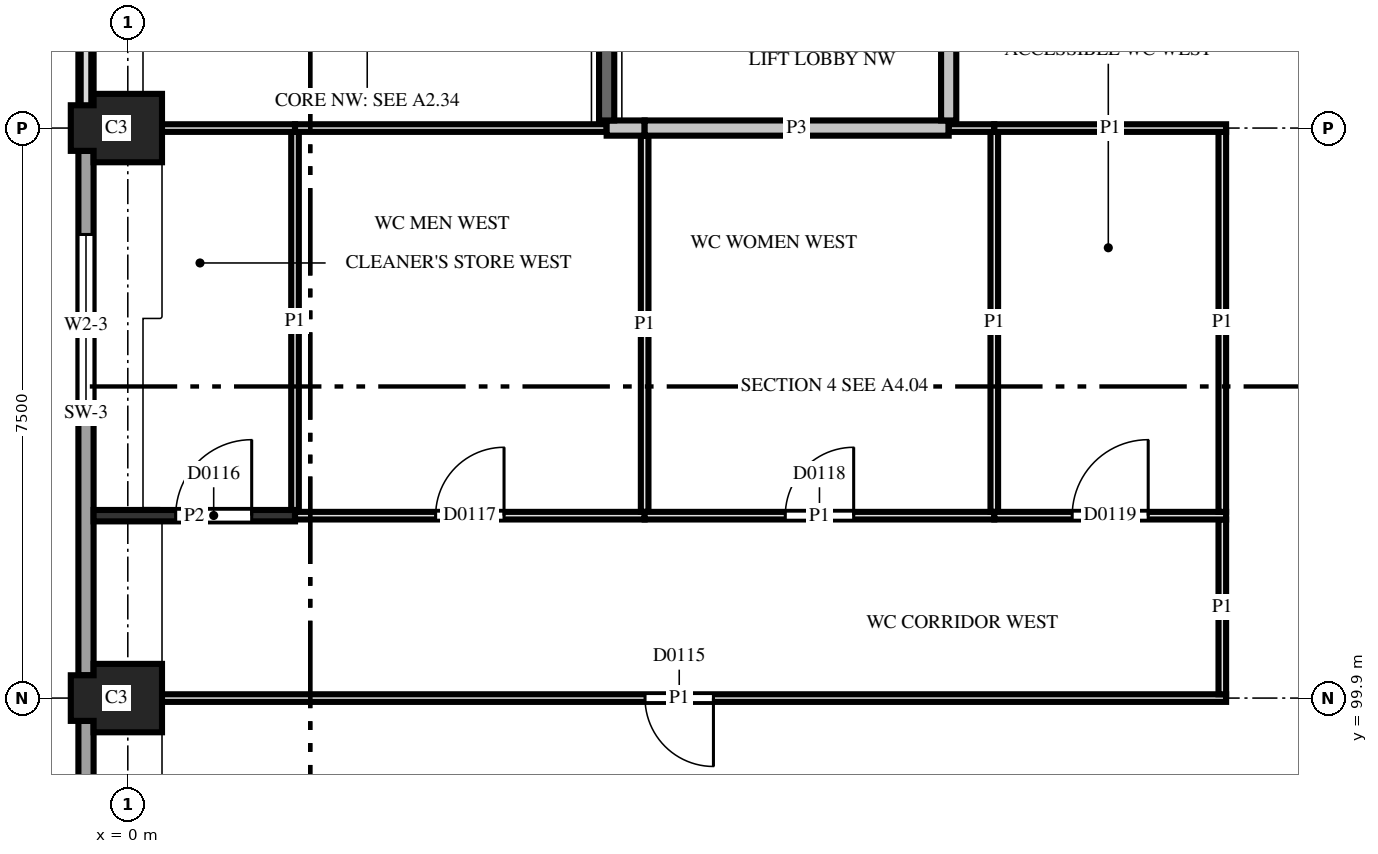
"""IFC4 building model, lengths in metres.
Left out: names, types, materials, properties, quantities, classifications, styles, units other than length and angle.
Written with IfcOpenShell. Run it as: python <this file> out.ifc"""

import sys

from ifc_helpers import new_model, si_unit, direction, frame, frame_2d, origin, place, context, subcontext, project, spatial, polyline, rectangle, outline, extrude, element, fill, save


model = new_model("IFC4")
c1 = context("Model", 3, precision=1e-05, world=origin(), true_north=direction((0.0, 1.0)))
c2 = subcontext(c1, "Body", "Model", "MODEL_VIEW")
j1 = project(units=[si_unit("LENGTHUNIT", "METRE"), si_unit("PLANEANGLEUNIT", "RADIAN")], contexts=[c1])
p1 = place(None, origin())
s1 = spatial("IfcSite", under=j1, at=p1, CompositionType="ELEMENT")
p2 = place(p1, origin())
s2 = spatial("IfcBuilding", under=s1, at=p2, CompositionType="ELEMENT")
p3 = place(p2, frame((0.0, 0.0, 4.5)))
s3 = spatial("IfcBuildingStorey", under=s2, at=p3, CompositionType="ELEMENT", Elevation=4.5)
for number, where, z_axis, x_axis in (
    (1, (0.0, 99.9, 0.0), (0.0, 0.0, 1.0), (-1.0, 0.0, 0.0)),
    (2, (0.0, 107.4, 0.0), (0.0, 0.0, 1.0), (-1.0, 0.0, 0.0)),
):
    element("IfcColumn", number, at=place(p3, frame(where, z_axis=z_axis, x_axis=x_axis)), inside=s3, PredefinedType="COLUMN", context=c2, shape_type="SweptSolid", body=[
        extrude(outline(polyline([(-0.45, -0.45), (0.45, -0.45), (0.45, -0.3), (0.75, -0.3), (0.75, 0.3), (0.45, 0.3), (0.45, 0.45), (-0.45, 0.45), (-0.45, -0.45)])), origin(), (0.0, 0.0, 1.0), 3.7),
    ])
p4 = place(p3, frame((-0.55, 114.6, 0.0), z_axis=(0.0, 0.0, 1.0), x_axis=(0.0, -1.0, 0.0)))
e3 = element("IfcWall", 3, at=p4, inside=s3, PredefinedType="SOLIDWALL", context=c2, shape_type="SweptSolid", body=[
    extrude(rectangle(XDim=6.9, YDim=0.2, at=frame_2d((3.45, 0.0))), origin(), (0.0, 0.0, 1.0), 2.3),
])
p5 = place(p3, frame((-0.55, 107.1, 0.0), z_axis=(0.0, 0.0, 1.0), x_axis=(0.0, -1.0, 0.0)))
e4 = element("IfcWall", 4, at=p5, inside=s3, PredefinedType="SOLIDWALL", context=c2, shape_type="SweptSolid", body=[
    extrude(rectangle(XDim=6.9, YDim=0.2, at=frame_2d((3.45, 0.0))), origin(), (0.0, 0.0, 1.0), 2.3),
])
p6 = place(p5, frame((1.1, 0.0, 0.55)))
e5 = element("IfcOpeningElement", 5, at=p6, cuts=e4, PredefinedType="OPENING", context=c2, shape_type="SweptSolid", body=[
    extrude(rectangle(XDim=2.4, YDim=1.0, at=frame_2d((1.2, 0.5))), frame((0.0, 0.11, 0.0), z_axis=(0.0, -1.0, 0.0), x_axis=(1.0, 0.0, 0.0)), (0.0, 0.0, 1.0), 0.22),
])
p7 = place(p3, frame((-0.55, 99.6, 0.0), z_axis=(0.0, 0.0, 1.0), x_axis=(0.0, -1.0, 0.0)))
e6 = element("IfcWall", 6, at=p7, inside=s3, PredefinedType="SOLIDWALL", context=c2, shape_type="SweptSolid", body=[
    extrude(rectangle(XDim=6.9, YDim=0.2, at=frame_2d((3.45, 0.0))), origin(), (0.0, 0.0, 1.0), 2.3),
])
p8 = place(p7, frame((2.25, 0.0, 0.55)))
e7 = element("IfcOpeningElement", 7, at=p8, cuts=e6, PredefinedType="OPENING", context=c2, shape_type="SweptSolid", body=[
    extrude(rectangle(XDim=2.4, YDim=1.0, at=frame_2d((1.2, 0.5))), frame((0.0, 0.11, 0.0), z_axis=(0.0, -1.0, 0.0), x_axis=(1.0, 0.0, 0.0)), (0.0, 0.0, 1.0), 0.22),
])
p9 = place(p3, frame((0.06, 99.9, 0.0), z_axis=(0.0, 0.0, 1.0), x_axis=(1.0, 0.0, 0.0)))
e8 = element("IfcWall", 8, at=p9, inside=s3, PredefinedType="PARTITIONING", context=c2, shape_type="SweptSolid", body=[
    extrude(rectangle(XDim=14.39, YDim=0.1, at=frame_2d((7.195, 0.0))), origin(), (0.0, 0.0, 1.0), 2.88),
])
p10 = place(p9, frame((6.745, 0.0, 0.0)))
e9 = element("IfcOpeningElement", 9, at=p10, cuts=e8, PredefinedType="OPENING", context=c2, shape_type="SweptSolid", body=[
    extrude(rectangle(XDim=0.9, YDim=2.1, at=frame_2d((0.45, 1.05))), frame((0.0, 0.06, 0.0), z_axis=(0.0, -1.0, 0.0), x_axis=(1.0, 0.0, 0.0)), (0.0, 0.0, 1.0), 0.12),
])
p11 = place(p3, frame((14.4, 99.95, 0.0), z_axis=(0.0, 0.0, 1.0), x_axis=(0.0, 1.0, 0.0)))
e10 = element("IfcWall", 10, at=p11, inside=s3, PredefinedType="PARTITIONING", context=c2, shape_type="SweptSolid", body=[
    extrude(rectangle(XDim=2.3, YDim=0.1, at=frame_2d((1.15, 0.0))), origin(), (0.0, 0.0, 1.0), 2.88),
])
p12 = place(p3, frame((2.2, 102.3, 0.0), z_axis=(0.0, 0.0, 1.0), x_axis=(-1.0, 0.0, 0.0)))
e11 = element("IfcWall", 11, at=p12, inside=s3, PredefinedType="PARTITIONING", context=c2, shape_type="SweptSolid", body=[
    extrude(rectangle(XDim=2.65, YDim=0.15, at=frame_2d((1.325, 0.0))), origin(), (0.0, 0.0, 1.0), 2.88),
])
p13 = place(p12, frame((0.57, 0.0, 0.0)))
e12 = element("IfcOpeningElement", 12, at=p13, cuts=e11, PredefinedType="OPENING", context=c2, shape_type="SweptSolid", body=[
    extrude(rectangle(XDim=1.0, YDim=2.1, at=frame_2d((0.5, 1.05))), frame((0.0, 0.085, 0.0), z_axis=(0.0, -1.0, 0.0), x_axis=(1.0, 0.0, 0.0)), (0.0, 0.0, 1.0), 0.17),
])
p14 = place(p3, frame((2.2, 102.375, 0.0), z_axis=(0.0, 0.0, 1.0), x_axis=(0.0, 1.0, 0.0)))
e13 = element("IfcWall", 13, at=p14, inside=s3, PredefinedType="PARTITIONING", context=c2, shape_type="SweptSolid", body=[
    extrude(rectangle(XDim=4.975, YDim=0.1, at=frame_2d((2.488, 0.0))), origin(), (0.0, 0.0, 1.0), 2.88),
])
p15 = place(p3, frame((6.8, 102.3, 0.0), z_axis=(0.0, 0.0, 1.0), x_axis=(-1.0, 0.0, 0.0)))
e14 = element("IfcWall", 14, at=p15, inside=s3, PredefinedType="PARTITIONING", context=c2, shape_type="SweptSolid", body=[
    extrude(rectangle(XDim=4.6, YDim=0.1, at=frame_2d((2.3, 0.0))), origin(), (0.0, 0.0, 1.0), 2.88),
])
p16 = place(p15, frame((1.85, 0.0, 0.0)))
e15 = element("IfcOpeningElement", 15, at=p16, cuts=e14, PredefinedType="OPENING", context=c2, shape_type="SweptSolid", body=[
    extrude(rectangle(XDim=0.9, YDim=2.1, at=frame_2d((0.45, 1.05))), frame((0.0, 0.06, 0.0), z_axis=(0.0, -1.0, 0.0), x_axis=(1.0, 0.0, 0.0)), (0.0, 0.0, 1.0), 0.12),
])
p17 = place(p3, frame((6.8, 102.35, 0.0), z_axis=(0.0, 0.0, 1.0), x_axis=(0.0, 1.0, 0.0)))
e16 = element("IfcWall", 16, at=p17, inside=s3, PredefinedType="PARTITIONING", context=c2, shape_type="SweptSolid", body=[
    extrude(rectangle(XDim=4.95, YDim=0.1, at=frame_2d((2.475, 0.0))), origin(), (0.0, 0.0, 1.0), 2.88),
])
p18 = place(p3, frame((11.4, 102.3, 0.0), z_axis=(0.0, 0.0, 1.0), x_axis=(-1.0, 0.0, 0.0)))
e17 = element("IfcWall", 17, at=p18, inside=s3, PredefinedType="PARTITIONING", context=c2, shape_type="SweptSolid", body=[
    extrude(rectangle(XDim=4.6, YDim=0.1, at=frame_2d((2.3, 0.0))), origin(), (0.0, 0.0, 1.0), 2.88),
])
p19 = place(p18, frame((1.85, 0.0, 0.0)))
e18 = element("IfcOpeningElement", 18, at=p19, cuts=e17, PredefinedType="OPENING", context=c2, shape_type="SweptSolid", body=[
    extrude(rectangle(XDim=0.9, YDim=2.1, at=frame_2d((0.45, 1.05))), frame((0.0, 0.06, 0.0), z_axis=(0.0, -1.0, 0.0), x_axis=(1.0, 0.0, 0.0)), (0.0, 0.0, 1.0), 0.12),
])
p20 = place(p3, frame((11.4, 102.35, 0.0), z_axis=(0.0, 0.0, 1.0), x_axis=(0.0, 1.0, 0.0)))
e19 = element("IfcWall", 19, at=p20, inside=s3, PredefinedType="PARTITIONING", context=c2, shape_type="SweptSolid", body=[
    extrude(rectangle(XDim=5.0, YDim=0.1, at=frame_2d((2.5, 0.0))), origin(), (0.0, 0.0, 1.0), 2.88),
])
p21 = place(p3, frame((14.45, 102.3, 0.0), z_axis=(0.0, 0.0, 1.0), x_axis=(-1.0, 0.0, 0.0)))
e20 = element("IfcWall", 20, at=p21, inside=s3, PredefinedType="PARTITIONING", context=c2, shape_type="SweptSolid", body=[
    extrude(rectangle(XDim=3.05, YDim=0.1, at=frame_2d((1.525, 0.0))), origin(), (0.0, 0.0, 1.0), 2.88),
])
p22 = place(p21, frame((1.025, 0.0, 0.0)))
e21 = element("IfcOpeningElement", 21, at=p22, cuts=e20, PredefinedType="OPENING", context=c2, shape_type="SweptSolid", body=[
    extrude(rectangle(XDim=1.0, YDim=2.1, at=frame_2d((0.5, 1.05))), frame((0.0, 0.06, 0.0), z_axis=(0.0, -1.0, 0.0), x_axis=(1.0, 0.0, 0.0)), (0.0, 0.0, 1.0), 0.12),
])
p23 = place(p3, frame((14.4, 102.35, 0.0), z_axis=(0.0, 0.0, 1.0), x_axis=(0.0, 1.0, 0.0)))
e22 = element("IfcWall", 22, at=p23, inside=s3, PredefinedType="PARTITIONING", context=c2, shape_type="SweptSolid", body=[
    extrude(rectangle(XDim=5.0, YDim=0.1, at=frame_2d((2.5, 0.0))), origin(), (0.0, 0.0, 1.0), 2.88),
])
p24 = place(p3, frame((2.2, 107.4, 0.0), z_axis=(0.0, 0.0, 1.0), x_axis=(-1.0, 0.0, 0.0)))
e23 = element("IfcWall", 23, at=p24, inside=s3, PredefinedType="PARTITIONING", context=c2, shape_type="SweptSolid", body=[
    extrude(rectangle(XDim=2.14, YDim=0.1, at=frame_2d((1.07, 0.0))), origin(), (0.0, 0.0, 1.0), 2.88),
])
p25 = place(p3, frame((6.3, 107.4, 0.0), z_axis=(0.0, 0.0, 1.0), x_axis=(-1.0, 0.0, 0.0)))
e24 = element("IfcWall", 24, at=p25, inside=s3, PredefinedType="PARTITIONING", context=c2, shape_type="SweptSolid", body=[
    extrude(rectangle(XDim=4.1, YDim=0.1, at=frame_2d((2.05, 0.0))), origin(), (0.0, 0.0, 1.0), 2.88),
])
p26 = place(p3, frame((6.3, 107.4, 0.0), z_axis=(0.0, 0.0, 1.0), x_axis=(1.0, 0.0, 0.0)))
e25 = element("IfcWall", 25, at=p26, inside=s3, PredefinedType="PARTITIONING", context=c2, shape_type="SweptSolid", body=[
    extrude(rectangle(XDim=0.5, YDim=0.2, at=frame_2d((0.25, 0.0))), origin(), (0.0, 0.0, 1.0), 2.88),
])
p27 = place(p3, frame((6.8, 107.4, 0.0), z_axis=(0.0, 0.0, 1.0), x_axis=(1.0, 0.0, 0.0)))
e26 = element("IfcWall", 26, at=p27, inside=s3, PredefinedType="PARTITIONING", context=c2, shape_type="SweptSolid", body=[
    extrude(rectangle(XDim=4.0, YDim=0.2, at=frame_2d((2.0, 0.0))), origin(), (0.0, 0.0, 1.0), 2.88),
])
p28 = place(p3, frame((10.8, 107.5, 0.0), z_axis=(0.0, 0.0, 1.0), x_axis=(0.0, 1.0, 0.0)))
e27 = element("IfcWall", 27, at=p28, inside=s3, PredefinedType="PARTITIONING", context=c2, shape_type="SweptSolid", body=[
    extrude(rectangle(XDim=7.85, YDim=0.2, at=frame_2d((3.925, 0.0))), origin(), (0.0, 0.0, 1.0), 2.88),
])
p29 = place(p28, frame((3.17, 0.0, 0.0)))
e28 = element("IfcOpeningElement", 28, at=p29, cuts=e27, PredefinedType="OPENING", context=c2, shape_type="SweptSolid", body=[
    extrude(rectangle(XDim=1.0, YDim=2.1, at=frame_2d((0.5, 1.05))), frame((0.0, 0.11, 0.0), z_axis=(0.0, -1.0, 0.0), x_axis=(1.0, 0.0, 0.0)), (0.0, 0.0, 1.0), 0.22),
])
p30 = place(p3, frame((11.4, 107.4, 0.0), z_axis=(0.0, 0.0, 1.0), x_axis=(-1.0, 0.0, 0.0)))
e29 = element("IfcWall", 29, at=p30, inside=s3, PredefinedType="PARTITIONING", context=c2, shape_type="SweptSolid", body=[
    extrude(rectangle(XDim=0.6, YDim=0.1, at=frame_2d((0.3, 0.0))), origin(), (0.0, 0.0, 1.0), 2.88),
])
p31 = place(p3, frame((14.45, 107.4, 0.0), z_axis=(0.0, 0.0, 1.0), x_axis=(-1.0, 0.0, 0.0)))
e30 = element("IfcWall", 30, at=p31, inside=s3, PredefinedType="PARTITIONING", context=c2, shape_type="SweptSolid", body=[
    extrude(rectangle(XDim=3.05, YDim=0.1, at=frame_2d((1.525, 0.0))), origin(), (0.0, 0.0, 1.0), 2.88),
])
p32 = place(p3, frame((6.3, 111.225, 0.0), z_axis=(0.0, 0.0, 1.0), x_axis=(0.0, -1.0, 0.0)))
e31 = element("IfcWall", 31, at=p32, inside=s3, PredefinedType="PARTITIONING", context=c2, shape_type="SweptSolid", body=[
    extrude(rectangle(XDim=3.725, YDim=0.2, at=frame_2d((1.863, 0.0))), origin(), (0.0, 0.0, 1.0), 2.88),
])
p33 = place(p32, frame((1.363, 0.0, 0.0)))
e32 = element("IfcOpeningElement", 32, at=p33, cuts=e31, PredefinedType="OPENING", context=c2, shape_type="SweptSolid", body=[
    extrude(rectangle(XDim=1.0, YDim=2.1, at=frame_2d((0.5, 1.05))), frame((0.0, 0.11, 0.0), z_axis=(0.0, -1.0, 0.0), x_axis=(1.0, 0.0, 0.0)), (0.0, 0.0, 1.0), 0.22),
])
p34 = place(p6, origin())
e33 = element("IfcWindow", 33, at=p34, inside=s3, PartitioningType="SINGLE_PANEL", PredefinedType="WINDOW", context=c2, shape_type="SweptSolid", body=[
    extrude(rectangle(XDim=2.4, YDim=1.0, at=frame_2d((1.2, 0.5))), frame((0.0, 0.03, 0.0), z_axis=(0.0, -1.0, 0.0), x_axis=(1.0, 0.0, 0.0)), (0.0, 0.0, 1.0), 0.06),
])
fill(e5, e33)
p35 = place(p10, origin())
e34 = element("IfcDoor", 34, at=p35, inside=s3, OperationType="SINGLE_SWING_RIGHT", PredefinedType="DOOR", context=c2, shape_type="SweptSolid", body=[
    extrude(rectangle(XDim=0.9, YDim=2.1, at=frame_2d((0.45, 1.05))), frame((0.0, 0.025, 0.0), z_axis=(0.0, -1.0, 0.0), x_axis=(1.0, 0.0, 0.0)), (0.0, 0.0, 1.0), 0.05),
])
fill(e9, e34)
p36 = place(p13, origin())
e35 = element("IfcDoor", 35, at=p36, inside=s3, OperationType="SINGLE_SWING_LEFT", PredefinedType="DOOR", context=c2, shape_type="SweptSolid", body=[
    extrude(rectangle(XDim=1.0, YDim=2.1, at=frame_2d((0.5, 1.05))), frame((0.0, 0.025, 0.0), z_axis=(0.0, -1.0, 0.0), x_axis=(1.0, 0.0, 0.0)), (0.0, 0.0, 1.0), 0.05),
])
fill(e12, e35)
p37 = place(p16, origin())
e36 = element("IfcDoor", 36, at=p37, inside=s3, OperationType="SINGLE_SWING_LEFT", PredefinedType="DOOR", context=c2, shape_type="SweptSolid", body=[
    extrude(rectangle(XDim=0.9, YDim=2.1, at=frame_2d((0.45, 1.05))), frame((0.0, 0.025, 0.0), z_axis=(0.0, -1.0, 0.0), x_axis=(1.0, 0.0, 0.0)), (0.0, 0.0, 1.0), 0.05),
])
fill(e15, e36)
p38 = place(p19, origin())
e37 = element("IfcDoor", 37, at=p38, inside=s3, OperationType="SINGLE_SWING_LEFT", PredefinedType="DOOR", context=c2, shape_type="SweptSolid", body=[
    extrude(rectangle(XDim=0.9, YDim=2.1, at=frame_2d((0.45, 1.05))), frame((0.0, 0.025, 0.0), z_axis=(0.0, -1.0, 0.0), x_axis=(1.0, 0.0, 0.0)), (0.0, 0.0, 1.0), 0.05),
])
fill(e18, e37)
p39 = place(p22, origin())
e38 = element("IfcDoor", 38, at=p39, inside=s3, OperationType="SINGLE_SWING_LEFT", PredefinedType="DOOR", context=c2, shape_type="SweptSolid", body=[
    extrude(rectangle(XDim=1.0, YDim=2.1, at=frame_2d((0.5, 1.05))), frame((0.0, 0.025, 0.0), z_axis=(0.0, -1.0, 0.0), x_axis=(1.0, 0.0, 0.0)), (0.0, 0.0, 1.0), 0.05),
])
fill(e21, e38)
save(model, sys.argv[1])
